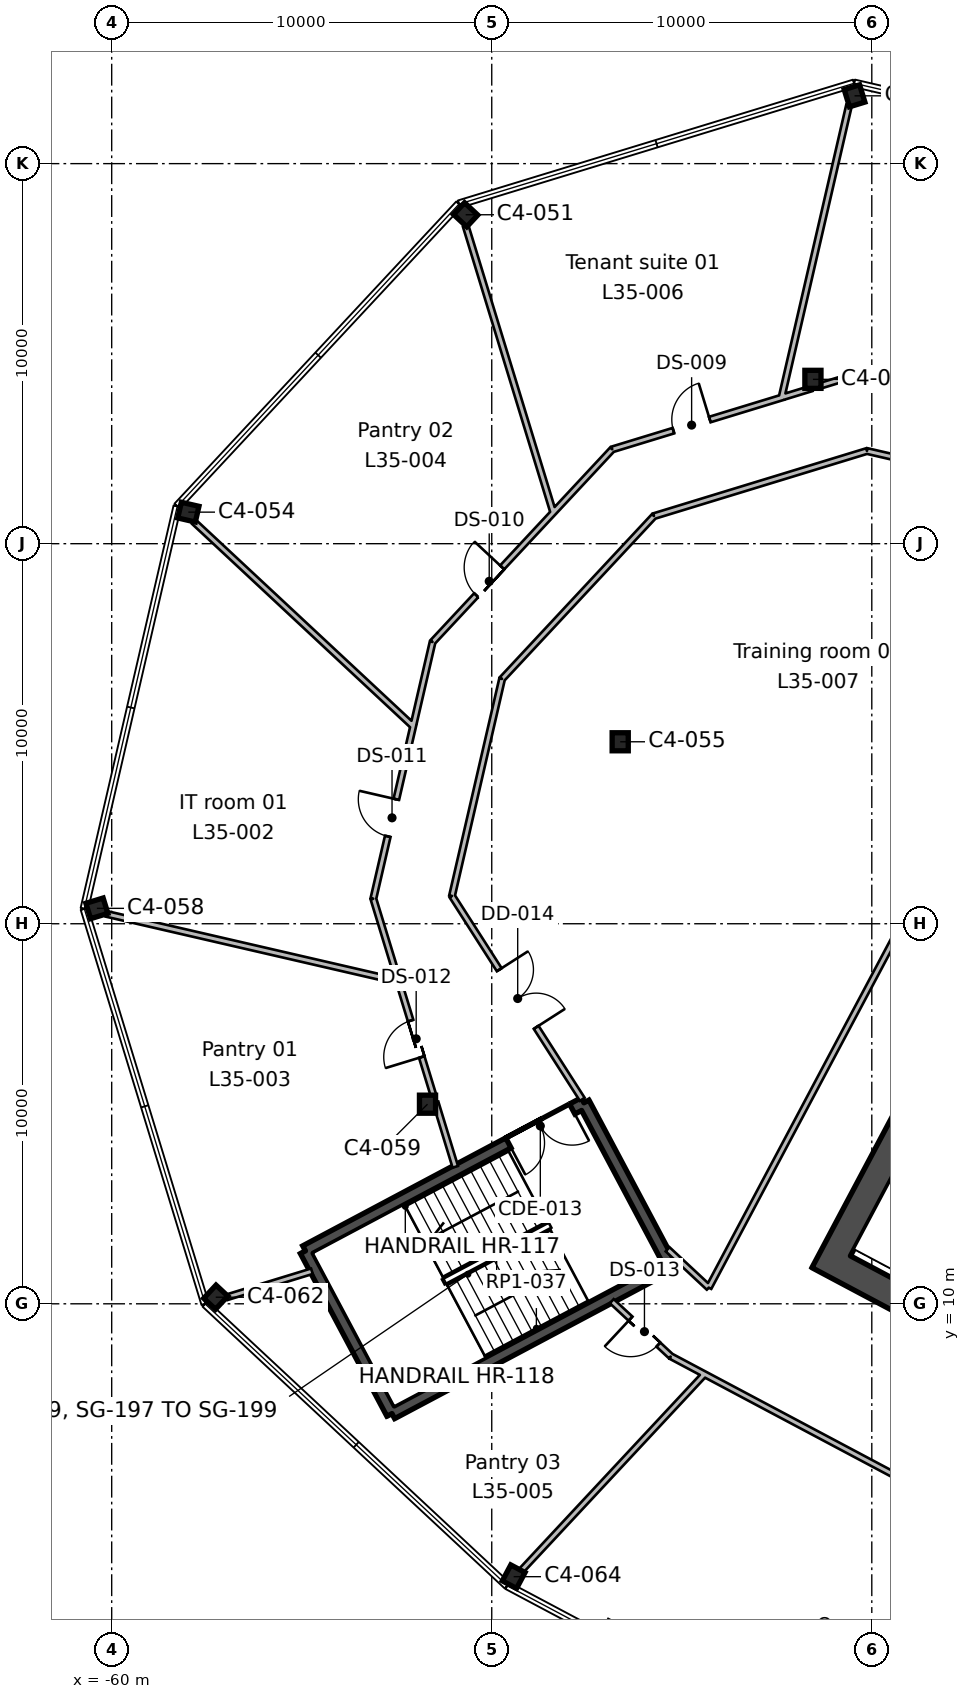
"""IFC4 building model, lengths in metres.
Left out: names, types, materials, properties, quantities, classifications, styles, units other than length and angle.
Written with IfcOpenShell. Run it as: python <this file> out.ifc"""

import sys

from ifc_helpers import new_model, si_unit, direction, frame, frame_2d, origin, origin_2d, place, context, subcontext, project, spatial, rectangle, i_section, extrude, element, fill, save


model = new_model("IFC4")
c1 = context("Model", 3, precision=1e-05, world=origin(), true_north=direction((0.0, 1.0)))
c2 = subcontext(c1, "Body", "Model", "MODEL_VIEW")
j1 = project(units=[si_unit("LENGTHUNIT", "METRE"), si_unit("PLANEANGLEUNIT", "RADIAN")], contexts=[c1])
p1 = place(None, origin())
s1 = spatial("IfcSite", under=j1, at=p1, CompositionType="ELEMENT")
p2 = place(p1, origin())
s2 = spatial("IfcBuilding", under=s1, at=p2, CompositionType="ELEMENT")
p3 = place(p2, frame((0.0, 0.0, 166.2)))
s3 = spatial("IfcBuildingStorey", under=s2, at=p3, CompositionType="ELEMENT", Elevation=166.2)
for number, where, z_axis, x_axis in (
    (1, (-49.423, 2.82, 0.0), (0.0, 0.0, 1.0), (0.883, -0.469, 0.0)),
    (2, (-57.262, 10.173, 0.0), (0.0, 0.0, 1.0), (0.731, -0.682, 0.0)),
    (3, (-51.69, 15.252, 0.0), (0.0, 0.0, 1.0), (1.0, 0.0, 0.0)),
    (4, (-60.39, 20.405, 0.0), (0.0, 0.0, 1.0), (0.292, -0.956, 0.0)),
    (5, (-46.62, 24.788, 0.0), (0.0, 0.0, 1.0), (1.0, 0.0, 0.0)),
    (6, (-57.983, 30.83, 0.0), (0.0, 0.0, 1.0), (-0.225, -0.974, 0.0)),
    (7, (-41.549, 34.324, 0.0), (0.0, 0.0, 1.0), (1.0, 0.0, 0.0)),
    (8, (-50.686, 38.655, 0.0), (0.0, 0.0, 1.0), (-0.682, -0.731, 0.0)),
    (9, (-40.454, 41.784, 0.0), (0.0, 0.0, 1.0), (-0.956, -0.292, 0.0)),
):
    element("IfcColumn", number, at=place(p3, frame(where, z_axis=z_axis, x_axis=x_axis)), inside=s3, PredefinedType="COLUMN", context=c2, shape_type="SweptSolid", body=[
        extrude(i_section(OverallWidth=0.424, OverallDepth=0.475, WebThickness=0.048, FlangeThickness=0.077, FilletRadius=0.015, at=origin_2d()), origin(), (0.0, 0.0, 1.0), 4.0),
    ])
p4 = place(p3, frame((-31.996, 28.168, 0.0), z_axis=(0.0, 0.0, 1.0), x_axis=(-0.469479580143, -0.882943329908, 0.0)))
e10 = element("IfcWall", 10, at=p4, inside=s3, PredefinedType="SHEAR", context=c2, shape_type="SweptSolid", body=[
    extrude(rectangle(XDim=19.7, YDim=0.75, at=frame_2d((9.85, 0.0))), origin(), (0.0, 0.0, 1.0), 4.0),
])
p5 = place(p4, frame((10.45, 0.0, 0.0)))
e11 = element("IfcOpeningElement", 11, at=p5, cuts=e10, PredefinedType="OPENING", context=c2, shape_type="SweptSolid", body=[
    extrude(rectangle(XDim=2.4, YDim=2.4, at=frame_2d((1.2, 1.2))), frame((0.0, 0.385, 0.0), z_axis=(0.0, -1.0, 0.0), x_axis=(1.0, 0.0, 0.0)), (0.0, 0.0, 1.0), 0.77),
])
p6 = place(p3, frame((-22.902, 1.446, 0.0), z_axis=(0.0, 0.0, 1.0), x_axis=(-0.88294509198, 0.469476266226, 0.0)))
e12 = element("IfcWall", 12, at=p6, inside=s3, PredefinedType="SHEAR", context=c2, shape_type="SweptSolid", body=[
    extrude(rectangle(XDim=20.2, YDim=0.75, at=frame_2d((10.1, 0.0))), origin(), (0.0, 0.0, 1.0), 4.0),
])
p7 = place(p3, frame((-47.574, 15.29, 0.0), z_axis=(0.0, 0.0, 1.0), x_axis=(0.469443498566, -0.882962514297, 0.0)))
e13 = element("IfcWall", 13, at=p7, inside=s3, PredefinedType="SHEAR", context=c2, shape_type="SweptSolid", body=[
    extrude(rectangle(XDim=4.85, YDim=0.3, at=frame_2d((2.425, 0.0))), origin(), (0.0, 0.0, 1.0), 4.0),
])
p8 = place(p3, frame((-45.297, 11.007, 0.0), z_axis=(0.0, 0.0, 1.0), x_axis=(-0.882951519127, -0.469464178475, 0.0)))
e14 = element("IfcWall", 14, at=p8, inside=s3, PredefinedType="SHEAR", context=c2, shape_type="SweptSolid", body=[
    extrude(rectangle(XDim=8.3, YDim=0.3, at=frame_2d((4.15, 0.0))), origin(), (0.0, 0.0, 1.0), 4.0),
])
p9 = place(p3, frame((-52.626, 7.111, 0.0), z_axis=(0.0, 0.0, 1.0), x_axis=(-0.469464364128, 0.882951420416, 0.0)))
e15 = element("IfcWall", 15, at=p9, inside=s3, PredefinedType="SHEAR", context=c2, shape_type="SweptSolid", body=[
    extrude(rectangle(XDim=4.85, YDim=0.3, at=frame_2d((2.425, 0.0))), origin(), (0.0, 0.0, 1.0), 4.0),
])
p10 = place(p3, frame((-54.903, 11.393, 0.0), z_axis=(0.0, 0.0, 1.0), x_axis=(0.882939326045, 0.469487110071, 0.0)))
e16 = element("IfcWall", 16, at=p10, inside=s3, PredefinedType="SHEAR", context=c2, shape_type="SweptSolid", body=[
    extrude(rectangle(XDim=8.3, YDim=0.3, at=frame_2d((4.15, 0.0))), origin(), (0.0, 0.0, 1.0), 4.0),
])
p11 = place(p10, frame((6.05, 0.0, 0.0)))
e17 = element("IfcOpeningElement", 17, at=p11, cuts=e16, PredefinedType="OPENING", context=c2, shape_type="SweptSolid", body=[
    extrude(rectangle(XDim=1.9, YDim=2.1, at=frame_2d((0.95, 1.05))), frame((0.0, 0.16, 0.0), z_axis=(0.0, -1.0, 0.0), x_axis=(1.0, 0.0, 0.0)), (0.0, 0.0, 1.0), 0.32),
])
p12 = place(p3, frame((-52.45, 18.484, 0.0), z_axis=(0.0, 0.0, 1.0), x_axis=(-0.974348948829, 0.225042498023, 0.0)))
e18 = element("IfcWall", 18, at=p12, inside=s3, PredefinedType="PARTITIONING", context=c2, shape_type="SweptSolid", body=[
    extrude(rectangle(XDim=7.892, YDim=0.15, at=frame_2d((3.946, 0.0))), origin(), (0.0, 0.0, 1.0), 3.64),
])
p13 = place(p3, frame((-57.841, 30.58, 0.0), z_axis=(0.0, 0.0, 1.0), x_axis=(0.731373012185, -0.681977651428, 0.0)))
e19 = element("IfcWall", 19, at=p13, inside=s3, PredefinedType="PARTITIONING", context=c2, shape_type="SweptSolid", body=[
    extrude(rectangle(XDim=7.893, YDim=0.15, at=frame_2d((3.947, 0.0))), origin(), (0.0, 0.0, 1.0), 3.64),
])
p14 = place(p3, frame((-54.732, 10.857, 0.0), z_axis=(0.0, 0.0, 1.0), x_axis=(-0.956196980242, -0.292723991119, 0.0)))
e20 = element("IfcWall", 20, at=p14, inside=s3, PredefinedType="PARTITIONING", context=c2, shape_type="SweptSolid", body=[
    extrude(rectangle(XDim=2.344, YDim=0.15, at=frame_2d((1.172, 0.0))), origin(), (0.0, 0.0, 1.0), 3.64),
])
p15 = place(p3, frame((-52.056, 25.246, 0.0), z_axis=(0.0, 0.0, 1.0), x_axis=(-0.224961765576, -0.97436759184, 0.0)))
e21 = element("IfcWall", 21, at=p15, inside=s3, PredefinedType="PARTITIONING", context=c2, shape_type="SweptSolid", body=[
    extrude(rectangle(XDim=4.708, YDim=0.15, at=frame_2d((2.354, 0.0))), origin(), (0.0, 0.0, 1.0), 3.64),
])
p16 = place(p15, frame((2.024, 0.0, 0.0)))
e22 = element("IfcOpeningElement", 22, at=p16, cuts=e21, PredefinedType="OPENING", context=c2, shape_type="SweptSolid", body=[
    extrude(rectangle(XDim=1.0, YDim=2.1, at=frame_2d((0.5, 1.05))), frame((0.0, 0.085, 0.0), z_axis=(0.0, -1.0, 0.0), x_axis=(1.0, 0.0, 0.0)), (0.0, 0.0, 1.0), 0.17),
])
p17 = place(p3, frame((-53.115, 20.659, 0.0), z_axis=(0.0, 0.0, 1.0), x_axis=(0.292062202153, -0.956399325634, 0.0)))
e23 = element("IfcWall", 23, at=p17, inside=s3, PredefinedType="PARTITIONING", context=c2, shape_type="SweptSolid", body=[
    extrude(rectangle(XDim=2.222, YDim=0.15, at=frame_2d((1.111, 0.0))), origin(), (0.0, 0.0, 1.0), 3.64),
])
p18 = place(p3, frame((-50.959, 13.604, 0.0), z_axis=(0.0, 0.0, 1.0), x_axis=(-0.292326826569, 0.95631847544, 0.0)))
e24 = element("IfcWall", 24, at=p18, inside=s3, PredefinedType="PARTITIONING", context=c2, shape_type="SweptSolid", body=[
    extrude(rectangle(XDim=1.776, YDim=0.15, at=frame_2d((0.888, 0.0))), origin(), (0.0, 0.0, 1.0), 3.64),
])
p19 = place(p3, frame((-51.535, 15.49, 0.0), z_axis=(0.0, 0.0, 1.0), x_axis=(-0.292522494411, 0.956258641929, 0.0)))
e25 = element("IfcWall", 25, at=p19, inside=s3, PredefinedType="PARTITIONING", context=c2, shape_type="SweptSolid", body=[
    extrude(rectangle(XDim=3.183, YDim=0.15, at=frame_2d((1.592, 0.0))), origin(), (0.0, 0.0, 1.0), 3.64),
])
p20 = place(p19, frame((1.05, 0.0, 0.0)))
e26 = element("IfcOpeningElement", 26, at=p20, cuts=e25, PredefinedType="OPENING", context=c2, shape_type="SweptSolid", body=[
    extrude(rectangle(XDim=1.0, YDim=2.1, at=frame_2d((0.5, 1.05))), frame((0.0, 0.085, 0.0), z_axis=(0.0, -1.0, 0.0), x_axis=(1.0, 0.0, 0.0)), (0.0, 0.0, 1.0), 0.17),
])
p21 = place(p3, frame((-48.345, 30.856, 0.0), z_axis=(0.0, 0.0, 1.0), x_axis=(-0.682044743799, -0.731310445335, 0.0)))
e27 = element("IfcWall", 27, at=p21, inside=s3, PredefinedType="PARTITIONING", context=c2, shape_type="SweptSolid", body=[
    extrude(rectangle(XDim=4.708, YDim=0.15, at=frame_2d((2.354, 0.0))), origin(), (0.0, 0.0, 1.0), 3.64),
])
p22 = place(p21, frame((2.024, 0.0, 0.0)))
e28 = element("IfcOpeningElement", 28, at=p22, cuts=e27, PredefinedType="OPENING", context=c2, shape_type="SweptSolid", body=[
    extrude(rectangle(XDim=1.0, YDim=2.1, at=frame_2d((0.5, 1.05))), frame((0.0, 0.085, 0.0), z_axis=(0.0, -1.0, 0.0), x_axis=(1.0, 0.0, 0.0)), (0.0, 0.0, 1.0), 0.17),
])
p23 = place(p3, frame((-51.556, 27.413, 0.0), z_axis=(0.0, 0.0, 1.0), x_axis=(-0.225019992363, -0.974354146621, 0.0)))
e29 = element("IfcWall", 29, at=p23, inside=s3, PredefinedType="PARTITIONING", context=c2, shape_type="SweptSolid", body=[
    extrude(rectangle(XDim=2.222, YDim=0.15, at=frame_2d((1.111, 0.0))), origin(), (0.0, 0.0, 1.0), 3.64),
])
p24 = place(p3, frame((-50.688, 38.366, 0.0), z_axis=(0.0, 0.0, 1.0), x_axis=(0.292463739097, -0.956276613388, 0.0)))
e30 = element("IfcWall", 30, at=p24, inside=s3, PredefinedType="PARTITIONING", context=c2, shape_type="SweptSolid", body=[
    extrude(rectangle(XDim=7.892, YDim=0.15, at=frame_2d((3.946, 0.0))), origin(), (0.0, 0.0, 1.0), 3.64),
])
p25 = place(p3, frame((-44.402, 8.149, 0.0), z_axis=(0.0, 0.0, 1.0), x_axis=(-0.682039957921, -0.731314908777, 0.0)))
e31 = element("IfcWall", 31, at=p25, inside=s3, PredefinedType="PARTITIONING", context=c2, shape_type="SweptSolid", body=[
    extrude(rectangle(XDim=7.065, YDim=0.15, at=frame_2d((3.533, 0.0))), origin(), (0.0, 0.0, 1.0), 3.64),
])
p26 = place(p3, frame((-42.326, 33.858, 0.0), z_axis=(0.0, 0.0, 1.0), x_axis=(-0.956351168554, -0.292219852858, 0.0)))
e32 = element("IfcWall", 32, at=p26, inside=s3, PredefinedType="PARTITIONING", context=c2, shape_type="SweptSolid", body=[
    extrude(rectangle(XDim=4.709, YDim=0.15, at=frame_2d((2.354, 0.0))), origin(), (0.0, 0.0, 1.0), 3.64),
])
p27 = place(p26, frame((2.025, 0.0, 0.0)))
e33 = element("IfcOpeningElement", 33, at=p27, cuts=e32, PredefinedType="OPENING", context=c2, shape_type="SweptSolid", body=[
    extrude(rectangle(XDim=1.0, YDim=2.1, at=frame_2d((0.5, 1.05))), frame((0.0, 0.085, 0.0), z_axis=(0.0, -1.0, 0.0), x_axis=(1.0, 0.0, 0.0)), (0.0, 0.0, 1.0), 0.17),
])
p28 = place(p3, frame((-46.829, 32.482, 0.0), z_axis=(0.0, 0.0, 1.0), x_axis=(-0.681891349178, -0.731453476249, 0.0)))
e34 = element("IfcWall", 34, at=p28, inside=s3, PredefinedType="PARTITIONING", context=c2, shape_type="SweptSolid", body=[
    extrude(rectangle(XDim=2.222, YDim=0.15, at=frame_2d((1.111, 0.0))), origin(), (0.0, 0.0, 1.0), 3.64),
])
p29 = place(p3, frame((-47.618, 15.38, 0.0), z_axis=(0.0, 0.0, 1.0), x_axis=(-0.539421032188, 0.842036192828, 0.0)))
e35 = element("IfcWall", 35, at=p29, inside=s3, PredefinedType="PARTITIONING", context=c2, shape_type="SweptSolid", body=[
    extrude(rectangle(XDim=6.355, YDim=0.15, at=frame_2d((3.177, 0.0))), origin(), (0.0, 0.0, 1.0), 3.64),
])
p30 = place(p29, frame((2.25, 0.0, 0.0)))
e36 = element("IfcOpeningElement", 36, at=p30, cuts=e35, PredefinedType="OPENING", context=c2, shape_type="SweptSolid", body=[
    extrude(rectangle(XDim=1.8, YDim=2.1, at=frame_2d((0.9, 1.05))), frame((0.0, 0.085, 0.0), z_axis=(0.0, -1.0, 0.0), x_axis=(1.0, 0.0, 0.0)), (0.0, 0.0, 1.0), 0.17),
])
p31 = place(p3, frame((-51.046, 20.731, 0.0), z_axis=(0.0, 0.0, 1.0), x_axis=(0.224889933684, 0.974384173582, 0.0)))
e37 = element("IfcWall", 37, at=p31, inside=s3, PredefinedType="PARTITIONING", context=c2, shape_type="SweptSolid", body=[
    extrude(rectangle(XDim=5.86, YDim=0.15, at=frame_2d((2.93, 0.0))), origin(), (0.0, 0.0, 1.0), 3.64),
])
p32 = place(p3, frame((-49.728, 26.441, 0.0), z_axis=(0.0, 0.0, 1.0), x_axis=(0.682098526533, 0.731260282049, 0.0)))
e38 = element("IfcWall", 38, at=p32, inside=s3, PredefinedType="PARTITIONING", context=c2, shape_type="SweptSolid", body=[
    extrude(rectangle(XDim=5.86, YDim=0.15, at=frame_2d((2.93, 0.0))), origin(), (0.0, 0.0, 1.0), 3.64),
])
p33 = place(p3, frame((-45.731, 30.726, 0.0), z_axis=(0.0, 0.0, 1.0), x_axis=(0.956310804041, 0.292351921619, 0.0)))
e39 = element("IfcWall", 39, at=p33, inside=s3, PredefinedType="PARTITIONING", context=c2, shape_type="SweptSolid", body=[
    extrude(rectangle(XDim=5.859, YDim=0.15, at=frame_2d((2.929, 0.0))), origin(), (0.0, 0.0, 1.0), 3.64),
])
p34 = place(p3, frame((-40.128, 32.439, 0.0), z_axis=(0.0, 0.0, 1.0), x_axis=(0.97437567891, -0.224926735515, 0.0)))
e40 = element("IfcWall", 40, at=p34, inside=s3, PredefinedType="PARTITIONING", context=c2, shape_type="SweptSolid", body=[
    extrude(rectangle(XDim=6.896, YDim=0.15, at=frame_2d((3.448, 0.0))), origin(), (0.0, 0.0, 1.0), 3.64),
])
p35 = place(p3, frame((-33.409, 30.888, 0.0), z_axis=(0.0, 0.0, 1.0), x_axis=(-0.469498189487, -0.882933434676, 0.0)))
e41 = element("IfcWall", 41, at=p35, inside=s3, PredefinedType="PARTITIONING", context=c2, shape_type="SweptSolid", body=[
    extrude(rectangle(XDim=23.176, YDim=0.15, at=frame_2d((11.588, 0.0))), origin(), (0.0, 0.0, 1.0), 3.64),
])
p36 = place(p3, frame((-44.29, 10.425, 0.0), z_axis=(0.0, 0.0, 1.0), x_axis=(-0.731652828982, 0.681677444135, 0.0)))
e42 = element("IfcWall", 42, at=p36, inside=s3, PredefinedType="PARTITIONING", context=c2, shape_type="SweptSolid", body=[
    extrude(rectangle(XDim=1.48, YDim=0.15, at=frame_2d((0.74, 0.0))), origin(), (0.0, 0.0, 1.0), 3.64),
])
p37 = place(p3, frame((-44.462, 8.181, 0.0), z_axis=(0.0, 0.0, 1.0), x_axis=(-0.882750253305, 0.469842516478, 0.0)))
e43 = element("IfcWall", 43, at=p37, inside=s3, PredefinedType="PARTITIONING", context=c2, shape_type="SweptSolid", body=[
    extrude(rectangle(XDim=0.935, YDim=0.15, at=frame_2d((0.467, 0.0))), origin(), (0.0, 0.0, 1.0), 3.64),
])
p38 = place(p3, frame((-45.287, 8.62, 0.0), z_axis=(0.0, 0.0, 1.0), x_axis=(-0.731593637228, 0.681740969846, 0.0)))
e44 = element("IfcWall", 44, at=p38, inside=s3, PredefinedType="PARTITIONING", context=c2, shape_type="SweptSolid", body=[
    extrude(rectangle(XDim=2.125, YDim=0.15, at=frame_2d((1.063, 0.0))), origin(), (0.0, 0.0, 1.0), 3.64),
])
p39 = place(p38, frame((0.45, 0.0, 0.0)))
e45 = element("IfcOpeningElement", 45, at=p39, cuts=e44, PredefinedType="OPENING", context=c2, shape_type="SweptSolid", body=[
    extrude(rectangle(XDim=1.0, YDim=2.1, at=frame_2d((0.5, 1.05))), frame((0.0, 0.085, 0.0), z_axis=(0.0, -1.0, 0.0), x_axis=(1.0, 0.0, 0.0)), (0.0, 0.0, 1.0), 0.17),
])
p40 = place(p3, frame((-13.6, -8.228, 0.0), z_axis=(0.0, 0.0, 1.0), x_axis=(-0.882954510497, 0.469458552369, 0.0)))
e46 = element("IfcWall", 46, at=p40, inside=s3, PredefinedType="PARTITIONING", context=c2, shape_type="SweptSolid", body=[
    extrude(rectangle(XDim=34.953, YDim=0.15, at=frame_2d((17.477, 0.0))), origin(), (0.0, 0.0, 1.0), 3.64),
])
p41 = place(p40, frame((16.55, 0.0, 0.0)))
e47 = element("IfcOpeningElement", 47, at=p41, cuts=e46, PredefinedType="OPENING", context=c2, shape_type="SweptSolid", body=[
    extrude(rectangle(XDim=1.8, YDim=2.1, at=frame_2d((0.9, 1.05))), frame((0.0, 0.085, 0.0), z_axis=(0.0, -1.0, 0.0), x_axis=(1.0, 0.0, 0.0)), (0.0, 0.0, 1.0), 0.17),
])
p42 = place(p40, frame((9.05, 0.0, 0.0)))
e48 = element("IfcOpeningElement", 48, at=p42, cuts=e46, PredefinedType="OPENING", context=c2, shape_type="SweptSolid", body=[
    extrude(rectangle(XDim=1.0, YDim=2.1, at=frame_2d((0.5, 1.05))), frame((0.0, 0.085, 0.0), z_axis=(0.0, -1.0, 0.0), x_axis=(1.0, 0.0, 0.0)), (0.0, 0.0, 1.0), 0.17),
])
p43 = place(p3, frame((-40.599, 41.534, 0.0), z_axis=(0.0, 0.0, 1.0), x_axis=(-0.225013130649, -0.974355731258, 0.0)))
e49 = element("IfcWall", 49, at=p43, inside=s3, PredefinedType="PARTITIONING", context=c2, shape_type="SweptSolid", body=[
    extrude(rectangle(XDim=7.892, YDim=0.15, at=frame_2d((3.946, 0.0))), origin(), (0.0, 0.0, 1.0), 3.64),
])
p44 = place(p3, frame((-34.677, 33.234, 0.0), z_axis=(0.0, 0.0, 1.0), x_axis=(-0.974367234575, 0.224963312978, 0.0)))
e50 = element("IfcWall", 50, at=p44, inside=s3, PredefinedType="PARTITIONING", context=c2, shape_type="SweptSolid", body=[
    extrude(rectangle(XDim=5.668, YDim=0.15, at=frame_2d((2.834, 0.0))), origin(), (0.0, 0.0, 1.0), 3.64),
])
p45 = place(p44, frame((2.35, 0.0, 0.0)))
e51 = element("IfcOpeningElement", 51, at=p45, cuts=e50, PredefinedType="OPENING", context=c2, shape_type="SweptSolid", body=[
    extrude(rectangle(XDim=1.0, YDim=2.1, at=frame_2d((0.5, 1.05))), frame((0.0, 0.085, 0.0), z_axis=(0.0, -1.0, 0.0), x_axis=(1.0, 0.0, 0.0)), (0.0, 0.0, 1.0), 0.17),
])
p46 = place(p3, frame((-40.2, 34.509, 0.0), z_axis=(0.0, 0.0, 1.0), x_axis=(-0.956177669283, -0.29278706386, 0.0)))
e52 = element("IfcWall", 52, at=p46, inside=s3, PredefinedType="PARTITIONING", context=c2, shape_type="SweptSolid", body=[
    extrude(rectangle(XDim=1.189, YDim=0.15, at=frame_2d((0.594, 0.0))), origin(), (0.0, 0.0, 1.0), 3.64),
])
p47 = place(p3, frame((-41.582, 34.087, 0.0), z_axis=(0.0, 0.0, 1.0), x_axis=(-0.956187735772, -0.292754186919, 0.0)))
e53 = element("IfcWall", 53, at=p47, inside=s3, PredefinedType="PARTITIONING", context=c2, shape_type="SweptSolid", body=[
    extrude(rectangle(XDim=0.799, YDim=0.15, at=frame_2d((0.399, 0.0))), origin(), (0.0, 0.0, 1.0), 3.64),
])
p48 = place(p11, frame((1.9, 0.0, 0.0), z_axis=(0.0, 0.0, 1.0), x_axis=(-1.0, 0.0, 0.0)))
e54 = element("IfcDoor", 54, at=p48, inside=s3, OperationType="DOUBLE_DOOR_SINGLE_SWING", PredefinedType="DOOR", context=c2, shape_type="SweptSolid", body=[
    extrude(rectangle(XDim=1.9, YDim=2.1, at=frame_2d((0.95, 1.05))), frame((0.0, 0.025, 0.0), z_axis=(0.0, -1.0, 0.0), x_axis=(1.0, 0.0, 0.0)), (0.0, 0.0, 1.0), 0.05),
])
fill(e17, e54)
p49 = place(p30, frame((1.8, 0.0, 0.0), z_axis=(0.0, 0.0, 1.0), x_axis=(-1.0, 0.0, 0.0)))
e55 = element("IfcDoor", 55, at=p49, inside=s3, OperationType="DOUBLE_DOOR_SINGLE_SWING", PredefinedType="DOOR", context=c2, shape_type="SweptSolid", body=[
    extrude(rectangle(XDim=1.8, YDim=2.1, at=frame_2d((0.9, 1.05))), frame((0.0, 0.025, 0.0), z_axis=(0.0, -1.0, 0.0), x_axis=(1.0, 0.0, 0.0)), (0.0, 0.0, 1.0), 0.05),
])
fill(e36, e55)
p50 = place(p27, frame((1.0, 0.0, 0.0), z_axis=(0.0, 0.0, 1.0), x_axis=(-1.0, 0.0, 0.0)))
e56 = element("IfcDoor", 56, at=p50, inside=s3, OperationType="SINGLE_SWING_RIGHT", PredefinedType="DOOR", context=c2, shape_type="SweptSolid", body=[
    extrude(rectangle(XDim=1.0, YDim=2.1, at=frame_2d((0.5, 1.05))), frame((0.0, 0.025, 0.0), z_axis=(0.0, -1.0, 0.0), x_axis=(1.0, 0.0, 0.0)), (0.0, 0.0, 1.0), 0.05),
])
fill(e33, e56)
p51 = place(p22, frame((1.0, 0.0, 0.0), z_axis=(0.0, 0.0, 1.0), x_axis=(-1.0, 0.0, 0.0)))
e57 = element("IfcDoor", 57, at=p51, inside=s3, OperationType="SINGLE_SWING_RIGHT", PredefinedType="DOOR", context=c2, shape_type="SweptSolid", body=[
    extrude(rectangle(XDim=1.0, YDim=2.1, at=frame_2d((0.5, 1.05))), frame((0.0, 0.025, 0.0), z_axis=(0.0, -1.0, 0.0), x_axis=(1.0, 0.0, 0.0)), (0.0, 0.0, 1.0), 0.05),
])
fill(e28, e57)
p52 = place(p16, frame((1.0, 0.0, 0.0), z_axis=(0.0, 0.0, 1.0), x_axis=(-1.0, 0.0, 0.0)))
e58 = element("IfcDoor", 58, at=p52, inside=s3, OperationType="SINGLE_SWING_RIGHT", PredefinedType="DOOR", context=c2, shape_type="SweptSolid", body=[
    extrude(rectangle(XDim=1.0, YDim=2.1, at=frame_2d((0.5, 1.05))), frame((0.0, 0.025, 0.0), z_axis=(0.0, -1.0, 0.0), x_axis=(1.0, 0.0, 0.0)), (0.0, 0.0, 1.0), 0.05),
])
fill(e22, e58)
p53 = place(p20, origin())
e59 = element("IfcDoor", 59, at=p53, inside=s3, OperationType="SINGLE_SWING_LEFT", PredefinedType="DOOR", context=c2, shape_type="SweptSolid", body=[
    extrude(rectangle(XDim=1.0, YDim=2.1, at=frame_2d((0.5, 1.05))), frame((0.0, 0.025, 0.0), z_axis=(0.0, -1.0, 0.0), x_axis=(1.0, 0.0, 0.0)), (0.0, 0.0, 1.0), 0.05),
])
fill(e26, e59)
p54 = place(p39, origin())
e60 = element("IfcDoor", 60, at=p54, inside=s3, OperationType="SINGLE_SWING_RIGHT", PredefinedType="DOOR", context=c2, shape_type="SweptSolid", body=[
    extrude(rectangle(XDim=1.0, YDim=2.1, at=frame_2d((0.5, 1.05))), frame((0.0, 0.025, 0.0), z_axis=(0.0, -1.0, 0.0), x_axis=(1.0, 0.0, 0.0)), (0.0, 0.0, 1.0), 0.05),
])
fill(e45, e60)
save(model, sys.argv[1])
